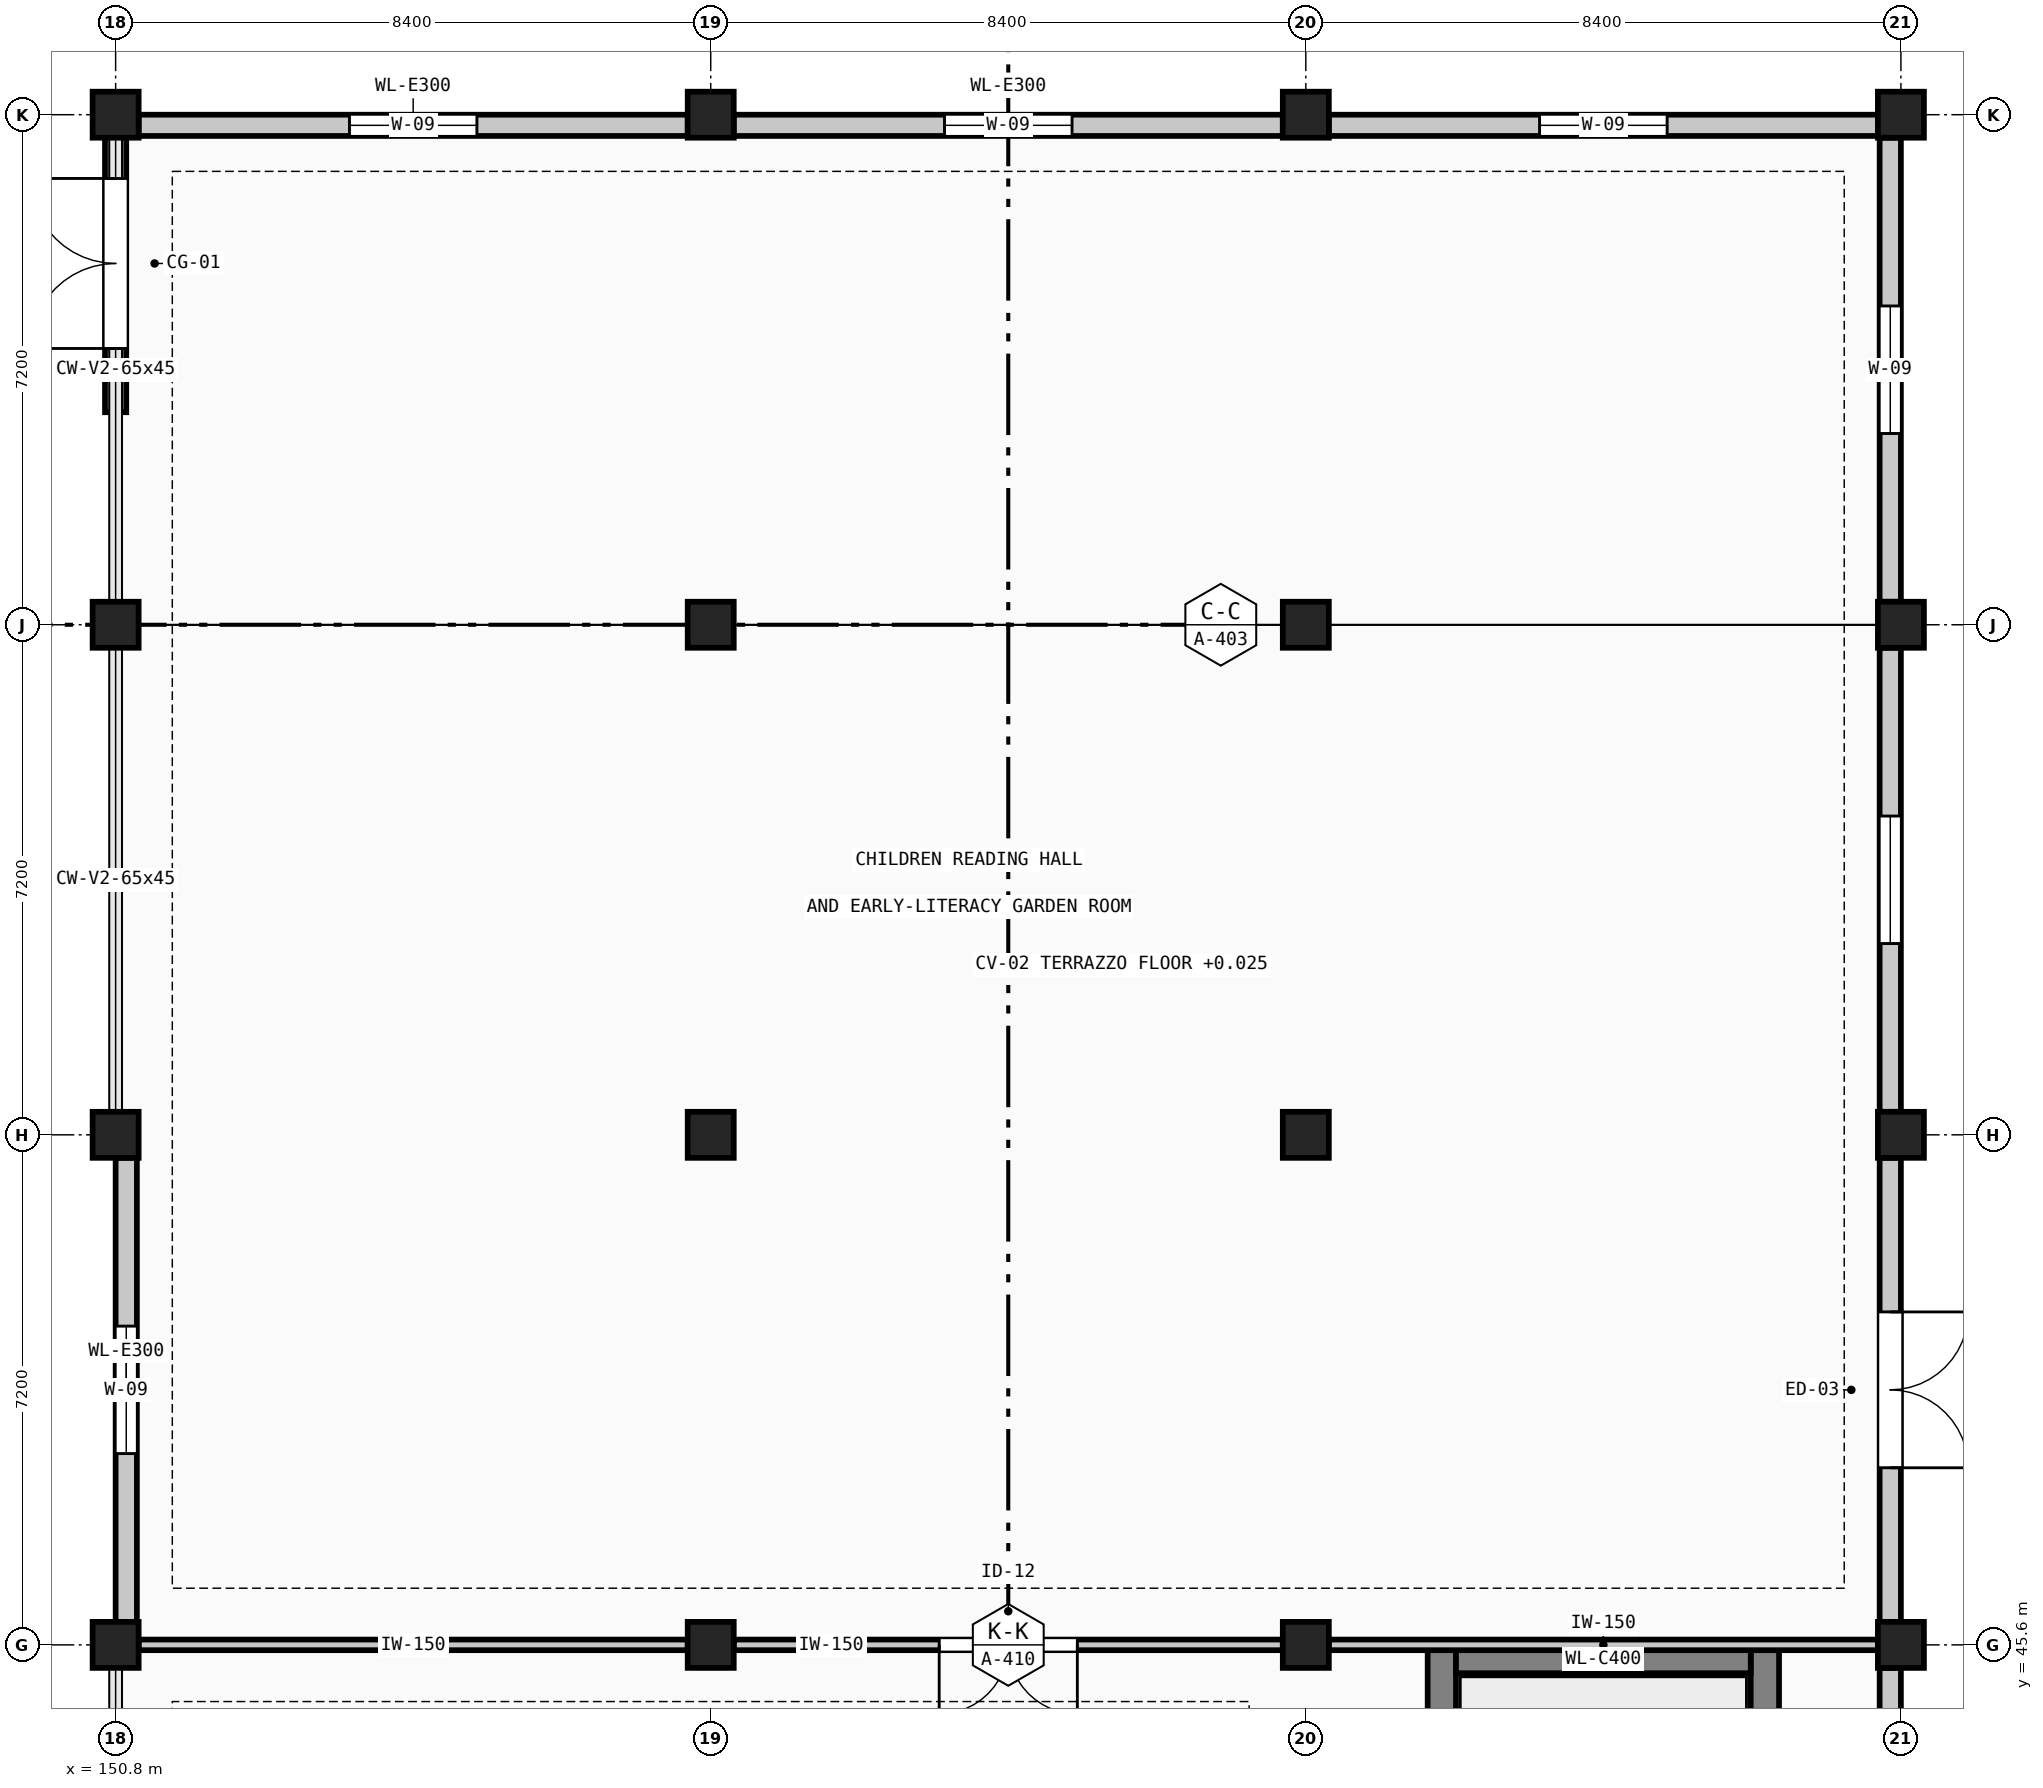
"""IFC4 building model, lengths in metres.
Left out: names, types, materials, properties, quantities, classifications, styles, units other than length and angle.
Written with IfcOpenShell. Run it as: python <this file> out.ifc"""

import sys

from ifc_helpers import new_model, si_unit, direction, frame, frame_2d, origin, origin_2d, place, context, subcontext, project, spatial, rectangle, extrude, element, fill, save


model = new_model("IFC4")
c1 = context("Model", 3, precision=1e-05, world=origin(), true_north=direction((0.0, 1.0)))
c2 = subcontext(c1, "Body", "Model", "MODEL_VIEW")
j1 = project(units=[si_unit("LENGTHUNIT", "METRE"), si_unit("PLANEANGLEUNIT", "RADIAN")], contexts=[c1])
p1 = place(None, origin())
s1 = spatial("IfcSite", under=j1, at=p1, CompositionType="ELEMENT")
p2 = place(p1, origin())
s2 = spatial("IfcBuilding", under=s1, at=p2, CompositionType="ELEMENT")
p3 = place(p2, origin())
s3 = spatial("IfcBuildingStorey", under=s2, at=p3, CompositionType="ELEMENT", Elevation=0.0)
for number, where, z_axis, x_axis in (
    (1, (150.8, 45.6, 0.0), (0.0, 0.0, 1.0), (1.0, 0.0, 0.0)),
    (2, (150.8, 52.8, 0.0), (0.0, 0.0, 1.0), (1.0, 0.0, 0.0)),
    (3, (150.8, 60.0, 0.0), (0.0, 0.0, 1.0), (1.0, 0.0, 0.0)),
    (4, (150.8, 67.2, 0.0), (0.0, 0.0, 1.0), (1.0, 0.0, 0.0)),
    (5, (159.2, 45.6, 0.0), (0.0, 0.0, 1.0), (1.0, 0.0, 0.0)),
    (6, (159.2, 52.8, 0.0), (0.0, 0.0, 1.0), (1.0, 0.0, 0.0)),
    (7, (159.2, 60.0, 0.0), (0.0, 0.0, 1.0), (1.0, 0.0, 0.0)),
    (8, (159.2, 67.2, 0.0), (0.0, 0.0, 1.0), (1.0, 0.0, 0.0)),
    (9, (167.6, 45.6, 0.0), (0.0, 0.0, 1.0), (1.0, 0.0, 0.0)),
    (10, (167.6, 52.8, 0.0), (0.0, 0.0, 1.0), (1.0, 0.0, 0.0)),
    (11, (167.6, 60.0, 0.0), (0.0, 0.0, 1.0), (1.0, 0.0, 0.0)),
    (12, (167.6, 67.2, 0.0), (0.0, 0.0, 1.0), (1.0, 0.0, 0.0)),
    (13, (176.0, 45.6, 0.0), (0.0, 0.0, 1.0), (1.0, 0.0, 0.0)),
    (14, (176.0, 52.8, 0.0), (0.0, 0.0, 1.0), (1.0, 0.0, 0.0)),
    (15, (176.0, 60.0, 0.0), (0.0, 0.0, 1.0), (1.0, 0.0, 0.0)),
    (16, (176.0, 67.2, 0.0), (0.0, 0.0, 1.0), (1.0, 0.0, 0.0)),
):
    element("IfcColumn", number, at=place(p3, frame(where, z_axis=z_axis, x_axis=x_axis)), inside=s3, PredefinedType="COLUMN", context=c2, shape_type="SweptSolid", body=[
        extrude(rectangle(XDim=0.65, YDim=0.65, at=origin_2d()), origin(), (0.0, 0.0, 1.0), 4.8),
    ])
for number, where, z_axis, x_axis in (
    (17, (169.52, 36.4, 0.0), (0.0, 0.0, 1.0), (0.0, 1.0, 0.0)),
    (18, (174.08, 45.6, 0.0), (0.0, 0.0, 1.0), (0.0, -1.0, 0.0)),
):
    element("IfcWall", number, at=place(p3, frame(where, z_axis=z_axis, x_axis=x_axis)), inside=s3, PredefinedType="SHEAR", context=c2, shape_type="SweptSolid", body=[
        extrude(rectangle(XDim=9.2, YDim=0.4, at=frame_2d((4.6, 0.0))), origin(), (0.0, 0.0, 1.0), 4.575),
    ])
p4 = place(p3, frame((169.72, 45.4, 0.0), z_axis=(0.0, 0.0, 1.0), x_axis=(1.0, 0.0, 0.0)))
e19 = element("IfcWall", 19, at=p4, inside=s3, PredefinedType="SHEAR", context=c2, shape_type="SweptSolid", body=[
    extrude(rectangle(XDim=4.16, YDim=0.4, at=frame_2d((2.08, 0.0))), origin(), (0.0, 0.0, 1.0), 4.575),
])
p5 = place(p3, frame((150.95, 45.925, 0.0), z_axis=(0.0, 0.0, 1.0), x_axis=(0.0, 1.0, 0.0)))
e20 = element("IfcWall", 20, at=p5, inside=s3, PredefinedType="SOLIDWALL", context=c2, shape_type="SweptSolid", body=[
    extrude(rectangle(XDim=6.55, YDim=0.3, at=frame_2d((3.275, 0.0))), origin(), (0.0, 0.0, 1.0), 4.2),
])
p6 = place(p5, frame((2.375, 0.0, 0.75)))
e21 = element("IfcOpeningElement", 21, at=p6, cuts=e20, PredefinedType="OPENING", context=c2, shape_type="SweptSolid", body=[
    extrude(rectangle(XDim=1.8, YDim=2.1, at=frame_2d((0.9, 1.05))), frame((0.0, 0.16, 0.0), z_axis=(0.0, -1.0, 0.0), x_axis=(1.0, 0.0, 0.0)), (0.0, 0.0, 1.0), 0.32),
])
p7 = place(p3, frame((151.125, 67.05, 0.0), z_axis=(0.0, 0.0, 1.0), x_axis=(1.0, 0.0, 0.0)))
e22 = element("IfcWall", 22, at=p7, inside=s3, PredefinedType="SOLIDWALL", context=c2, shape_type="SweptSolid", body=[
    extrude(rectangle(XDim=7.75, YDim=0.3, at=frame_2d((3.875, 0.0))), origin(), (0.0, 0.0, 1.0), 4.1),
])
p8 = place(p7, frame((2.975, 0.0, 0.75)))
e23 = element("IfcOpeningElement", 23, at=p8, cuts=e22, PredefinedType="OPENING", context=c2, shape_type="SweptSolid", body=[
    extrude(rectangle(XDim=1.8, YDim=2.1, at=frame_2d((0.9, 1.05))), frame((0.0, 0.16, 0.0), z_axis=(0.0, -1.0, 0.0), x_axis=(1.0, 0.0, 0.0)), (0.0, 0.0, 1.0), 0.32),
])
p9 = place(p3, frame((159.525, 67.05, 0.0), z_axis=(0.0, 0.0, 1.0), x_axis=(1.0, 0.0, 0.0)))
e24 = element("IfcWall", 24, at=p9, inside=s3, PredefinedType="SOLIDWALL", context=c2, shape_type="SweptSolid", body=[
    extrude(rectangle(XDim=7.75, YDim=0.3, at=frame_2d((3.875, 0.0))), origin(), (0.0, 0.0, 1.0), 4.1),
])
p10 = place(p9, frame((2.975, 0.0, 0.75)))
e25 = element("IfcOpeningElement", 25, at=p10, cuts=e24, PredefinedType="OPENING", context=c2, shape_type="SweptSolid", body=[
    extrude(rectangle(XDim=1.8, YDim=2.1, at=frame_2d((0.9, 1.05))), frame((0.0, 0.16, 0.0), z_axis=(0.0, -1.0, 0.0), x_axis=(1.0, 0.0, 0.0)), (0.0, 0.0, 1.0), 0.32),
])
p11 = place(p3, frame((167.925, 67.05, 0.0), z_axis=(0.0, 0.0, 1.0), x_axis=(1.0, 0.0, 0.0)))
e26 = element("IfcWall", 26, at=p11, inside=s3, PredefinedType="SOLIDWALL", context=c2, shape_type="SweptSolid", body=[
    extrude(rectangle(XDim=7.75, YDim=0.3, at=frame_2d((3.875, 0.0))), origin(), (0.0, 0.0, 1.0), 4.1),
])
p12 = place(p11, frame((2.975, 0.0, 0.75)))
e27 = element("IfcOpeningElement", 27, at=p12, cuts=e26, PredefinedType="OPENING", context=c2, shape_type="SweptSolid", body=[
    extrude(rectangle(XDim=1.8, YDim=2.1, at=frame_2d((0.9, 1.05))), frame((0.0, 0.16, 0.0), z_axis=(0.0, -1.0, 0.0), x_axis=(1.0, 0.0, 0.0)), (0.0, 0.0, 1.0), 0.32),
])
p13 = place(p3, frame((175.85, 66.875, 0.0), z_axis=(0.0, 0.0, 1.0), x_axis=(0.0, -1.0, 0.0)))
e28 = element("IfcWall", 28, at=p13, inside=s3, PredefinedType="SOLIDWALL", context=c2, shape_type="SweptSolid", body=[
    extrude(rectangle(XDim=6.55, YDim=0.3, at=frame_2d((3.275, 0.0))), origin(), (0.0, 0.0, 1.0), 4.2),
])
p14 = place(p13, frame((2.375, 0.0, 0.75)))
e29 = element("IfcOpeningElement", 29, at=p14, cuts=e28, PredefinedType="OPENING", context=c2, shape_type="SweptSolid", body=[
    extrude(rectangle(XDim=1.8, YDim=2.1, at=frame_2d((0.9, 1.05))), frame((0.0, 0.16, 0.0), z_axis=(0.0, -1.0, 0.0), x_axis=(1.0, 0.0, 0.0)), (0.0, 0.0, 1.0), 0.32),
])
p15 = place(p3, frame((175.85, 59.675, 0.0), z_axis=(0.0, 0.0, 1.0), x_axis=(0.0, -1.0, 0.0)))
e30 = element("IfcWall", 30, at=p15, inside=s3, PredefinedType="SOLIDWALL", context=c2, shape_type="SweptSolid", body=[
    extrude(rectangle(XDim=6.55, YDim=0.3, at=frame_2d((3.275, 0.0))), origin(), (0.0, 0.0, 1.0), 4.2),
])
p16 = place(p15, frame((2.375, 0.0, 0.75)))
e31 = element("IfcOpeningElement", 31, at=p16, cuts=e30, PredefinedType="OPENING", context=c2, shape_type="SweptSolid", body=[
    extrude(rectangle(XDim=1.8, YDim=2.1, at=frame_2d((0.9, 1.05))), frame((0.0, 0.16, 0.0), z_axis=(0.0, -1.0, 0.0), x_axis=(1.0, 0.0, 0.0)), (0.0, 0.0, 1.0), 0.32),
])
p17 = place(p3, frame((175.85, 52.475, 0.0), z_axis=(0.0, 0.0, 1.0), x_axis=(0.0, -1.0, 0.0)))
e32 = element("IfcWall", 32, at=p17, inside=s3, PredefinedType="SOLIDWALL", context=c2, shape_type="SweptSolid", body=[
    extrude(rectangle(XDim=6.55, YDim=0.3, at=frame_2d((3.275, 0.0))), origin(), (0.0, 0.0, 1.0), 4.2),
])
p18 = place(p17, frame((2.175, 0.0, 0.0)))
e33 = element("IfcOpeningElement", 33, at=p18, cuts=e32, PredefinedType="OPENING", context=c2, shape_type="SweptSolid", body=[
    extrude(rectangle(XDim=2.2, YDim=2.4, at=frame_2d((1.1, 1.2))), frame((0.0, 0.16, 0.0), z_axis=(0.0, -1.0, 0.0), x_axis=(1.0, 0.0, 0.0)), (0.0, 0.0, 1.0), 0.32),
])
p19 = place(p3, frame((175.85, 45.275, 0.0), z_axis=(0.0, 0.0, 1.0), x_axis=(0.0, -1.0, 0.0)))
e34 = element("IfcWall", 34, at=p19, inside=s3, PredefinedType="SOLIDWALL", context=c2, shape_type="SweptSolid", body=[
    extrude(rectangle(XDim=6.55, YDim=0.3, at=frame_2d((3.275, 0.0))), origin(), (0.0, 0.0, 1.0), 4.2),
])
p20 = place(p19, frame((2.375, 0.0, 0.75)))
e35 = element("IfcOpeningElement", 35, at=p20, cuts=e34, PredefinedType="OPENING", context=c2, shape_type="SweptSolid", body=[
    extrude(rectangle(XDim=1.8, YDim=2.1, at=frame_2d((0.9, 1.05))), frame((0.0, 0.16, 0.0), z_axis=(0.0, -1.0, 0.0), x_axis=(1.0, 0.0, 0.0)), (0.0, 0.0, 1.0), 0.32),
])
p21 = place(p3, frame((150.8, 63.0, 0.0), z_axis=(0.0, 0.0, 1.0), x_axis=(0.0, 1.0, 0.0)))
e36 = element("IfcWall", 36, at=p21, inside=s3, PredefinedType="SOLIDWALL", context=c2, shape_type="SweptSolid", body=[
    extrude(rectangle(XDim=4.2, YDim=0.3, at=frame_2d((2.1, 0.0))), origin(), (0.0, 0.0, 1.0), 3.0),
])
p22 = place(p21, frame((0.9, 0.0, 0.0)))
e37 = element("IfcOpeningElement", 37, at=p22, cuts=e36, PredefinedType="OPENING", context=c2, shape_type="SweptSolid", body=[
    extrude(rectangle(XDim=2.4, YDim=2.2, at=frame_2d((1.2, 1.1))), frame((0.0, 0.16, 0.0), z_axis=(0.0, -1.0, 0.0), x_axis=(1.0, 0.0, 0.0)), (0.0, 0.0, 1.0), 0.32),
])
p23 = place(p3, frame((175.675, 45.6, 0.0), z_axis=(0.0, 0.0, 1.0), x_axis=(-1.0, 0.0, 0.0)))
e38 = element("IfcWall", 38, at=p23, inside=s3, PredefinedType="PARTITIONING", context=c2, shape_type="SweptSolid", body=[
    extrude(rectangle(XDim=7.75, YDim=0.15, at=frame_2d((3.875, 0.0))), origin(), (0.0, 0.0, 1.0), 4.525),
])
p24 = place(p3, frame((167.275, 45.6, 0.0), z_axis=(0.0, 0.0, 1.0), x_axis=(-1.0, 0.0, 0.0)))
e39 = element("IfcWall", 39, at=p24, inside=s3, PredefinedType="PARTITIONING", context=c2, shape_type="SweptSolid", body=[
    extrude(rectangle(XDim=7.75, YDim=0.15, at=frame_2d((3.875, 0.0))), origin(), (0.0, 0.0, 1.0), 4.0),
])
p25 = place(p24, frame((2.9, 0.0, 0.0)))
e40 = element("IfcOpeningElement", 40, at=p25, cuts=e39, PredefinedType="OPENING", context=c2, shape_type="SweptSolid", body=[
    extrude(rectangle(XDim=1.95, YDim=2.35, at=frame_2d((0.975, 1.175))), frame((0.0, 0.085, 0.0), z_axis=(0.0, -1.0, 0.0), x_axis=(1.0, 0.0, 0.0)), (0.0, 0.0, 1.0), 0.17),
])
p26 = place(p3, frame((158.875, 45.6, 0.0), z_axis=(0.0, 0.0, 1.0), x_axis=(-1.0, 0.0, 0.0)))
e41 = element("IfcWall", 41, at=p26, inside=s3, PredefinedType="PARTITIONING", context=c2, shape_type="SweptSolid", body=[
    extrude(rectangle(XDim=7.75, YDim=0.15, at=frame_2d((3.875, 0.0))), origin(), (0.0, 0.0, 1.0), 4.0),
])
p27 = place(p6, origin())
e42 = element("IfcWindow", 42, at=p27, inside=s3, PartitioningType="SINGLE_PANEL", PredefinedType="WINDOW", context=c2, shape_type="SweptSolid", body=[
    extrude(rectangle(XDim=1.8, YDim=2.1, at=frame_2d((0.9, 1.05))), frame((0.0, 0.03, 0.0), z_axis=(0.0, -1.0, 0.0), x_axis=(1.0, 0.0, 0.0)), (0.0, 0.0, 1.0), 0.06),
])
fill(e21, e42)
p28 = place(p8, origin())
e43 = element("IfcWindow", 43, at=p28, inside=s3, PartitioningType="SINGLE_PANEL", PredefinedType="WINDOW", context=c2, shape_type="SweptSolid", body=[
    extrude(rectangle(XDim=1.8, YDim=2.1, at=frame_2d((0.9, 1.05))), frame((0.0, 0.03, 0.0), z_axis=(0.0, -1.0, 0.0), x_axis=(1.0, 0.0, 0.0)), (0.0, 0.0, 1.0), 0.06),
])
fill(e23, e43)
p29 = place(p10, origin())
e44 = element("IfcWindow", 44, at=p29, inside=s3, PartitioningType="SINGLE_PANEL", PredefinedType="WINDOW", context=c2, shape_type="SweptSolid", body=[
    extrude(rectangle(XDim=1.8, YDim=2.1, at=frame_2d((0.9, 1.05))), frame((0.0, 0.03, 0.0), z_axis=(0.0, -1.0, 0.0), x_axis=(1.0, 0.0, 0.0)), (0.0, 0.0, 1.0), 0.06),
])
fill(e25, e44)
p30 = place(p12, origin())
e45 = element("IfcWindow", 45, at=p30, inside=s3, PartitioningType="SINGLE_PANEL", PredefinedType="WINDOW", context=c2, shape_type="SweptSolid", body=[
    extrude(rectangle(XDim=1.8, YDim=2.1, at=frame_2d((0.9, 1.05))), frame((0.0, 0.03, 0.0), z_axis=(0.0, -1.0, 0.0), x_axis=(1.0, 0.0, 0.0)), (0.0, 0.0, 1.0), 0.06),
])
fill(e27, e45)
p31 = place(p14, origin())
e46 = element("IfcWindow", 46, at=p31, inside=s3, PartitioningType="SINGLE_PANEL", PredefinedType="WINDOW", context=c2, shape_type="SweptSolid", body=[
    extrude(rectangle(XDim=1.8, YDim=2.1, at=frame_2d((0.9, 1.05))), frame((0.0, 0.03, 0.0), z_axis=(0.0, -1.0, 0.0), x_axis=(1.0, 0.0, 0.0)), (0.0, 0.0, 1.0), 0.06),
])
fill(e29, e46)
p32 = place(p16, origin())
e47 = element("IfcWindow", 47, at=p32, inside=s3, PartitioningType="SINGLE_PANEL", PredefinedType="WINDOW", context=c2, shape_type="SweptSolid", body=[
    extrude(rectangle(XDim=1.8, YDim=2.1, at=frame_2d((0.9, 1.05))), frame((0.0, 0.03, 0.0), z_axis=(0.0, -1.0, 0.0), x_axis=(1.0, 0.0, 0.0)), (0.0, 0.0, 1.0), 0.06),
])
fill(e31, e47)
p33 = place(p18, origin())
e48 = element("IfcDoor", 48, at=p33, inside=s3, OperationType="DOUBLE_DOOR_SINGLE_SWING", PredefinedType="DOOR", context=c2, shape_type="SweptSolid", body=[
    extrude(rectangle(XDim=2.2, YDim=2.4, at=frame_2d((1.1, 1.2))), frame((0.0, 0.025, 0.0), z_axis=(0.0, -1.0, 0.0), x_axis=(1.0, 0.0, 0.0)), (0.0, 0.0, 1.0), 0.05),
])
fill(e33, e48)
p34 = place(p22, origin())
e49 = element("IfcDoor", 49, at=p34, inside=s3, OperationType="DOUBLE_DOOR_SINGLE_SWING", PredefinedType="GATE", context=c2, shape_type="SweptSolid", body=[
    extrude(rectangle(XDim=2.4, YDim=2.2, at=frame_2d((1.2, 1.1))), frame((0.0, 0.025, 0.0), z_axis=(0.0, -1.0, 0.0), x_axis=(1.0, 0.0, 0.0)), (0.0, 0.0, 1.0), 0.05),
])
fill(e37, e49)
p35 = place(p25, origin())
e50 = element("IfcDoor", 50, at=p35, inside=s3, OperationType="DOUBLE_DOOR_SINGLE_SWING", PredefinedType="DOOR", context=c2, shape_type="SweptSolid", body=[
    extrude(rectangle(XDim=1.95, YDim=2.35, at=frame_2d((0.975, 1.175))), frame((0.0, 0.025, 0.0), z_axis=(0.0, -1.0, 0.0), x_axis=(1.0, 0.0, 0.0)), (0.0, 0.0, 1.0), 0.05),
])
fill(e40, e50)
save(model, sys.argv[1])
